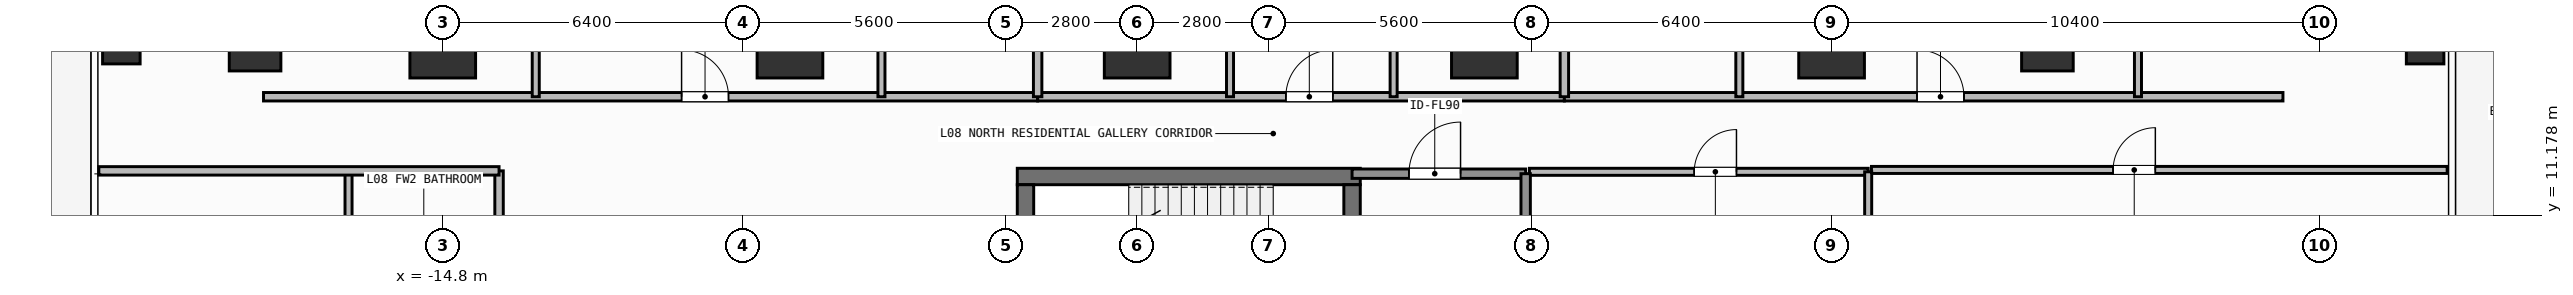
"""IFC4 building model, lengths in metres.
Left out: names, types, materials, properties, quantities, classifications, styles, units other than length and angle.
Written with IfcOpenShell. Run it as: python <this file> out.ifc"""

import sys

from ifc_helpers import new_model, si_unit, direction, frame, frame_2d, origin, origin_2d, place, context, subcontext, project, spatial, rectangle, hollow_rectangle, extrude, element, fill, save


model = new_model("IFC4")
c1 = context("Model", 3, precision=1e-05, world=origin(), true_north=direction((0.0, 1.0)))
c2 = subcontext(c1, "Body", "Model", "MODEL_VIEW")
j1 = project(units=[si_unit("LENGTHUNIT", "METRE"), si_unit("PLANEANGLEUNIT", "RADIAN")], contexts=[c1])
p1 = place(None, origin())
s1 = spatial("IfcSite", under=j1, at=p1, CompositionType="ELEMENT")
p2 = place(p1, origin())
s2 = spatial("IfcBuilding", under=s1, at=p2, CompositionType="ELEMENT")
p3 = place(p2, frame((0.0, 0.0, 30.6)))
s3 = spatial("IfcBuildingStorey", under=s2, at=p3, CompositionType="ELEMENT", Elevation=30.6)
p4 = place(p3, frame((-2.555, 12.0, 0.0), z_axis=(0.0, 0.0, 1.0), x_axis=(1.0, 0.0, 0.0)))
e1 = element("IfcWall", 1, at=p4, inside=s3, PredefinedType="SHEAR", context=c2, shape_type="SweptSolid", body=[
    extrude(rectangle(XDim=7.31, YDim=0.35, at=frame_2d((3.655, 0.0))), origin(), (0.0, 0.0, 1.0), 3.9),
])
p5 = place(p3, frame((-2.38, 8.9, 0.0), z_axis=(0.0, 0.0, 1.0), x_axis=(0.0, 1.0, 0.0)))
e2 = element("IfcWall", 2, at=p5, inside=s3, PredefinedType="SHEAR", context=c2, shape_type="SweptSolid", body=[
    extrude(rectangle(XDim=2.925, YDim=0.35, at=frame_2d((1.462, 0.0))), origin(), (0.0, 0.0, 1.0), 3.9),
])
p6 = place(p3, frame((4.58, 11.825, 0.0), z_axis=(0.0, 0.0, 1.0), x_axis=(0.0, -1.0, 0.0)))
e3 = element("IfcWall", 3, at=p6, inside=s3, PredefinedType="SHEAR", context=c2, shape_type="SweptSolid", body=[
    extrude(rectangle(XDim=2.925, YDim=0.35, at=frame_2d((1.462, 0.0))), origin(), (0.0, 0.0, 1.0), 3.9),
])
p7 = place(p6, frame((0.913, 0.0, 0.0)))
e4 = element("IfcOpeningElement", 4, at=p7, cuts=e3, PredefinedType="OPENING", context=c2, shape_type="SweptSolid", body=[
    extrude(rectangle(XDim=1.1, YDim=2.15, at=frame_2d((0.55, 1.075))), frame((0.0, 0.185, 0.0), z_axis=(0.0, -1.0, 0.0), x_axis=(1.0, 0.0, 0.0)), (0.0, 0.0, 1.0), 0.37),
])
for number, where, z_axis, x_axis in (
    (5, (-14.8, 14.8, 0.0), (0.0, 0.0, 1.0), (1.0, 0.0, 0.0)),
    (6, (-7.4, 14.8, 0.0), (0.0, 0.0, 1.0), (1.0, 0.0, 0.0)),
    (7, (0.0, 14.8, 0.0), (0.0, 0.0, 1.0), (1.0, 0.0, 0.0)),
    (8, (7.4, 14.8, 0.0), (0.0, 0.0, 1.0), (1.0, 0.0, 0.0)),
    (9, (14.8, 14.8, 0.0), (0.0, 0.0, 1.0), (1.0, 0.0, 0.0)),
):
    element("IfcColumn", number, at=place(p3, frame(where, z_axis=z_axis, x_axis=x_axis)), inside=s3, PredefinedType="COLUMN", context=c2, shape_type="SweptSolid", body=[
        extrude(rectangle(XDim=1.4, YDim=1.4, at=origin_2d()), origin(), (0.0, 0.0, 1.0), 3.9),
    ])
for number, where, z_axis, x_axis in (
    (10, (-18.8, 14.8, 0.0), (0.0, 0.0, 1.0), (1.0, 0.0, 0.0)),
    (11, (19.4, 14.8, 0.0), (0.0, 0.0, 1.0), (1.0, 0.0, 0.0)),
):
    element("IfcColumn", number, at=place(p3, frame(where, z_axis=z_axis, x_axis=x_axis)), inside=s3, PredefinedType="COLUMN", context=c2, shape_type="SweptSolid", body=[
        extrude(rectangle(XDim=1.1, YDim=1.1, at=origin_2d()), origin(), (0.0, 0.0, 1.0), 3.9),
    ])
for number, where, z_axis, x_axis in (
    (12, (-21.65, 14.8, 0.0), (0.0, 0.0, 1.0), (1.0, 0.0, 0.0)),
    (13, (27.45, 14.8, 0.0), (0.0, 0.0, 1.0), (1.0, 0.0, 0.0)),
):
    element("IfcColumn", number, at=place(p3, frame(where, z_axis=z_axis, x_axis=x_axis)), inside=s3, PredefinedType="COLUMN", context=c2, shape_type="SweptSolid", body=[
        extrude(hollow_rectangle(XDim=0.8, YDim=0.8, WallThickness=0.036, at=origin_2d()), origin(), (0.0, 0.0, 1.0), 3.9),
    ])
p8 = place(p3, frame((4.58, 12.06, 0.0), z_axis=(0.0, 0.0, 1.0), x_axis=(1.0, 0.0, 0.0)))
e14 = element("IfcWall", 14, at=p8, inside=s3, PredefinedType="SOLIDWALL", context=c2, shape_type="SweptSolid", body=[
    extrude(rectangle(XDim=3.7, YDim=0.2, at=frame_2d((1.85, 0.0))), origin(), (0.0, 0.0, 1.0), 3.68),
])
p9 = place(p8, frame((1.212, 0.0, 0.0)))
e15 = element("IfcOpeningElement", 15, at=p9, cuts=e14, PredefinedType="OPENING", context=c2, shape_type="SweptSolid", body=[
    extrude(rectangle(XDim=1.1, YDim=2.15, at=frame_2d((0.55, 1.075))), frame((0.0, 0.11, 0.0), z_axis=(0.0, -1.0, 0.0), x_axis=(1.0, 0.0, 0.0)), (0.0, 0.0, 1.0), 0.22),
])
p10 = place(p3, frame((8.36, 12.1, 0.0), z_axis=(0.0, 0.0, 1.0), x_axis=(1.0, 0.0, 0.0)))
e16 = element("IfcWall", 16, at=p10, inside=s3, PredefinedType="PARTITIONING", context=c2, shape_type="SweptSolid", body=[
    extrude(rectangle(XDim=7.22, YDim=0.15, at=frame_2d((3.61, 0.0))), origin(), (0.0, 0.0, 1.0), 3.68),
])
p11 = place(p10, frame((3.513, 0.0, 0.0)))
e17 = element("IfcOpeningElement", 17, at=p11, cuts=e16, PredefinedType="OPENING", context=c2, shape_type="SweptSolid", body=[
    extrude(rectangle(XDim=0.9, YDim=2.1, at=frame_2d((0.45, 1.05))), frame((0.0, 0.085, 0.0), z_axis=(0.0, -1.0, 0.0), x_axis=(1.0, 0.0, 0.0)), (0.0, 0.0, 1.0), 0.17),
])
p12 = place(p3, frame((-18.62, 13.7, 0.0), z_axis=(0.0, 0.0, 1.0), x_axis=(1.0, 0.0, 0.0)))
e18 = element("IfcWall", 18, at=p12, inside=s3, PredefinedType="PARTITIONING", context=c2, shape_type="SweptSolid", body=[
    extrude(rectangle(XDim=16.499, YDim=0.18, at=frame_2d((8.25, 0.0))), origin(), (0.0, 0.0, 1.0), 3.68),
])
p13 = place(p12, frame((8.91, 0.0, 0.0)))
e19 = element("IfcOpeningElement", 19, at=p13, cuts=e18, PredefinedType="OPENING", context=c2, shape_type="SweptSolid", body=[
    extrude(rectangle(XDim=1.0, YDim=2.2, at=frame_2d((0.5, 1.1))), frame((0.0, 0.1, 0.0), z_axis=(0.0, -1.0, 0.0), x_axis=(1.0, 0.0, 0.0)), (0.0, 0.0, 1.0), 0.2),
])
p14 = place(p3, frame((-12.818, 13.7, 0.0), z_axis=(0.0, 0.0, 1.0), x_axis=(0.0, 1.0, 0.0)))
e20 = element("IfcWall", 20, at=p14, inside=s3, PredefinedType="PARTITIONING", context=c2, shape_type="SweptSolid", body=[
    extrude(rectangle(XDim=7.09, YDim=0.15, at=frame_2d((3.545, 0.0))), origin(), (0.0, 0.0, 1.0), 3.68),
])
p15 = place(p14, frame((3.03, 0.0, 0.0)))
e21 = element("IfcOpeningElement", 21, at=p15, cuts=e20, PredefinedType="OPENING", context=c2, shape_type="SweptSolid", body=[
    extrude(rectangle(XDim=0.85, YDim=2.1, at=frame_2d((0.425, 1.05))), frame((0.0, 0.085, 0.0), z_axis=(0.0, -1.0, 0.0), x_axis=(1.0, 0.0, 0.0)), (0.0, 0.0, 1.0), 0.17),
])
p16 = place(p3, frame((-5.45, 13.7, 0.0), z_axis=(0.0, 0.0, 1.0), x_axis=(0.0, 1.0, 0.0)))
e22 = element("IfcWall", 22, at=p16, inside=s3, PredefinedType="PARTITIONING", context=c2, shape_type="SweptSolid", body=[
    extrude(rectangle(XDim=4.566, YDim=0.15, at=frame_2d((2.283, 0.0))), origin(), (0.0, 0.0, 1.0), 3.68),
])
p17 = place(p16, frame((1.948, 0.0, 0.0)))
e23 = element("IfcOpeningElement", 23, at=p17, cuts=e22, PredefinedType="OPENING", context=c2, shape_type="SweptSolid", body=[
    extrude(rectangle(XDim=0.85, YDim=2.1, at=frame_2d((0.425, 1.05))), frame((0.0, 0.085, 0.0), z_axis=(0.0, -1.0, 0.0), x_axis=(1.0, 0.0, 0.0)), (0.0, 0.0, 1.0), 0.17),
])
p18 = place(p3, frame((-2.121, 13.7, 0.0), z_axis=(0.0, 0.0, 1.0), x_axis=(1.0, 0.0, 0.0)))
e24 = element("IfcWall", 24, at=p18, inside=s3, PredefinedType="PARTITIONING", context=c2, shape_type="SweptSolid", body=[
    extrude(rectangle(XDim=11.226, YDim=0.18, at=frame_2d((5.613, 0.0))), origin(), (0.0, 0.0, 1.0), 3.68),
])
p19 = place(p18, frame((5.29, 0.0, 0.0)))
e25 = element("IfcOpeningElement", 25, at=p19, cuts=e24, PredefinedType="OPENING", context=c2, shape_type="SweptSolid", body=[
    extrude(rectangle(XDim=1.0, YDim=2.2, at=frame_2d((0.5, 1.1))), frame((0.0, 0.1, 0.0), z_axis=(0.0, -1.0, 0.0), x_axis=(1.0, 0.0, 0.0)), (0.0, 0.0, 1.0), 0.2),
])
p20 = place(p3, frame((1.979, 13.7, 0.0), z_axis=(0.0, 0.0, 1.0), x_axis=(0.0, 1.0, 0.0)))
e26 = element("IfcWall", 26, at=p20, inside=s3, PredefinedType="PARTITIONING", context=c2, shape_type="SweptSolid", body=[
    extrude(rectangle(XDim=7.09, YDim=0.15, at=frame_2d((3.545, 0.0))), origin(), (0.0, 0.0, 1.0), 3.68),
])
p21 = place(p20, frame((3.03, 0.0, 0.0)))
e27 = element("IfcOpeningElement", 27, at=p21, cuts=e26, PredefinedType="OPENING", context=c2, shape_type="SweptSolid", body=[
    extrude(rectangle(XDim=0.85, YDim=2.1, at=frame_2d((0.425, 1.05))), frame((0.0, 0.085, 0.0), z_axis=(0.0, -1.0, 0.0), x_axis=(1.0, 0.0, 0.0)), (0.0, 0.0, 1.0), 0.17),
])
p22 = place(p3, frame((5.466, 13.7, 0.0), z_axis=(0.0, 0.0, 1.0), x_axis=(0.0, 1.0, 0.0)))
e28 = element("IfcWall", 28, at=p22, inside=s3, PredefinedType="PARTITIONING", context=c2, shape_type="SweptSolid", body=[
    extrude(rectangle(XDim=7.09, YDim=0.15, at=frame_2d((3.545, 0.0))), origin(), (0.0, 0.0, 1.0), 3.68),
])
p23 = place(p22, frame((3.03, 0.0, 0.0)))
e29 = element("IfcOpeningElement", 29, at=p23, cuts=e28, PredefinedType="OPENING", context=c2, shape_type="SweptSolid", body=[
    extrude(rectangle(XDim=0.85, YDim=2.1, at=frame_2d((0.425, 1.05))), frame((0.0, 0.085, 0.0), z_axis=(0.0, -1.0, 0.0), x_axis=(1.0, 0.0, 0.0)), (0.0, 0.0, 1.0), 0.17),
])
p24 = place(p3, frame((9.105, 13.7, 0.0), z_axis=(0.0, 0.0, 1.0), x_axis=(1.0, 0.0, 0.0)))
e30 = element("IfcWall", 30, at=p24, inside=s3, PredefinedType="PARTITIONING", context=c2, shape_type="SweptSolid", body=[
    extrude(rectangle(XDim=15.315, YDim=0.18, at=frame_2d((7.657, 0.0))), origin(), (0.0, 0.0, 1.0), 3.68),
])
p25 = place(p24, frame((7.516, 0.0, 0.0)))
e31 = element("IfcOpeningElement", 31, at=p25, cuts=e30, PredefinedType="OPENING", context=c2, shape_type="SweptSolid", body=[
    extrude(rectangle(XDim=1.0, YDim=2.2, at=frame_2d((0.5, 1.1))), frame((0.0, 0.1, 0.0), z_axis=(0.0, -1.0, 0.0), x_axis=(1.0, 0.0, 0.0)), (0.0, 0.0, 1.0), 0.2),
])
p26 = place(p3, frame((12.834, 13.7, 0.0), z_axis=(0.0, 0.0, 1.0), x_axis=(0.0, 1.0, 0.0)))
e32 = element("IfcWall", 32, at=p26, inside=s3, PredefinedType="PARTITIONING", context=c2, shape_type="SweptSolid", body=[
    extrude(rectangle(XDim=7.09, YDim=0.15, at=frame_2d((3.545, 0.0))), origin(), (0.0, 0.0, 1.0), 3.68),
])
p27 = place(p26, frame((3.03, 0.0, 0.0)))
e33 = element("IfcOpeningElement", 33, at=p27, cuts=e32, PredefinedType="OPENING", context=c2, shape_type="SweptSolid", body=[
    extrude(rectangle(XDim=0.85, YDim=2.1, at=frame_2d((0.425, 1.05))), frame((0.0, 0.085, 0.0), z_axis=(0.0, -1.0, 0.0), x_axis=(1.0, 0.0, 0.0)), (0.0, 0.0, 1.0), 0.17),
])
p28 = place(p3, frame((21.33, 13.7, 0.0), z_axis=(0.0, 0.0, 1.0), x_axis=(0.0, 1.0, 0.0)))
e34 = element("IfcWall", 34, at=p28, inside=s3, PredefinedType="PARTITIONING", context=c2, shape_type="SweptSolid", body=[
    extrude(rectangle(XDim=4.148, YDim=0.15, at=frame_2d((2.074, 0.0))), origin(), (0.0, 0.0, 1.0), 3.68),
])
p29 = place(p28, frame((1.737, 0.0, 0.0)))
e35 = element("IfcOpeningElement", 35, at=p29, cuts=e34, PredefinedType="OPENING", context=c2, shape_type="SweptSolid", body=[
    extrude(rectangle(XDim=0.85, YDim=2.1, at=frame_2d((0.425, 1.05))), frame((0.0, 0.085, 0.0), z_axis=(0.0, -1.0, 0.0), x_axis=(1.0, 0.0, 0.0)), (0.0, 0.0, 1.0), 0.17),
])
p30 = place(p3, frame((-13.6, 0.727, 0.0), z_axis=(0.0, 0.0, 1.0), x_axis=(0.0, 1.0, 0.0)))
e36 = element("IfcWall", 36, at=p30, inside=s3, PredefinedType="PARTITIONING", context=c2, shape_type="SweptSolid", body=[
    extrude(rectangle(XDim=11.393, YDim=0.18, at=frame_2d((5.697, 0.0))), origin(), (0.0, 0.0, 1.0), 3.68),
])
p31 = place(p30, frame((4.837, 0.0, 0.0)))
e37 = element("IfcOpeningElement", 37, at=p31, cuts=e36, PredefinedType="OPENING", context=c2, shape_type="SweptSolid", body=[
    extrude(rectangle(XDim=1.0, YDim=2.2, at=frame_2d((0.5, 1.1))), frame((0.0, 0.1, 0.0), z_axis=(0.0, -1.0, 0.0), x_axis=(1.0, 0.0, 0.0)), (0.0, 0.0, 1.0), 0.2),
])
p32 = place(p3, frame((15.65, 12.14, 0.0), z_axis=(0.0, 0.0, 1.0), x_axis=(1.0, 0.0, 0.0)))
e38 = element("IfcWall", 38, at=p32, inside=s3, PredefinedType="PARTITIONING", context=c2, shape_type="SweptSolid", body=[
    extrude(rectangle(XDim=12.27, YDim=0.15, at=frame_2d((6.135, 0.0))), origin(), (0.0, 0.0, 1.0), 3.68),
])
p33 = place(p32, frame((5.15, 0.0, 0.0)))
e39 = element("IfcOpeningElement", 39, at=p33, cuts=e38, PredefinedType="OPENING", context=c2, shape_type="SweptSolid", body=[
    extrude(rectangle(XDim=0.9, YDim=2.1, at=frame_2d((0.45, 1.05))), frame((0.0, 0.085, 0.0), z_axis=(0.0, -1.0, 0.0), x_axis=(1.0, 0.0, 0.0)), (0.0, 0.0, 1.0), 0.17),
])
p34 = place(p3, frame((8.28, 8.95, 0.0), z_axis=(0.0, 0.0, 1.0), x_axis=(0.0, 1.0, 0.0)))
e40 = element("IfcWall", 40, at=p34, inside=s3, PredefinedType="SOLIDWALL", context=c2, shape_type="SweptSolid", body=[
    extrude(rectangle(XDim=3.11, YDim=0.2, at=frame_2d((1.555, 0.0))), origin(), (0.0, 0.0, 1.0), 3.68),
])
p35 = place(p3, frame((15.58, 5.85, 0.0), z_axis=(0.0, 0.0, 1.0), x_axis=(0.0, 1.0, 0.0)))
e41 = element("IfcWall", 41, at=p35, inside=s3, PredefinedType="PARTITIONING", context=c2, shape_type="SweptSolid", body=[
    extrude(rectangle(XDim=6.25, YDim=0.15, at=frame_2d((3.125, 0.0))), origin(), (0.0, 0.0, 1.0), 3.68),
])
for number, where, z_axis, x_axis in (
    (42, (-2.121, 13.7, 0.0), (0.0, 0.0, 1.0), (0.0, 1.0, 0.0)),
    (43, (9.105, 13.7, 0.0), (0.0, 0.0, 1.0), (0.0, 1.0, 0.0)),
):
    element("IfcWall", number, at=place(p3, frame(where, z_axis=z_axis, x_axis=x_axis)), inside=s3, PredefinedType="PARTITIONING", context=c2, shape_type="SweptSolid", body=[
        extrude(rectangle(XDim=11.33, YDim=0.18, at=frame_2d((5.665, 0.0))), origin(), (0.0, 0.0, 1.0), 3.68),
    ])
p36 = place(p3, frame((-16.808, 9.32, 0.0), z_axis=(0.0, 0.0, 1.0), x_axis=(0.0, 1.0, 0.0)))
e44 = element("IfcWall", 44, at=p36, inside=s3, PredefinedType="PARTITIONING", context=c2, shape_type="SweptSolid", body=[
    extrude(rectangle(XDim=2.8, YDim=0.15, at=frame_2d((1.4, 0.0))), origin(), (0.0, 0.0, 1.0), 3.68),
])
p37 = place(p3, frame((-22.13, 12.12, 0.0), z_axis=(0.0, 0.0, 1.0), x_axis=(1.0, 0.0, 0.0)))
e45 = element("IfcWall", 45, at=p37, inside=s3, PredefinedType="PARTITIONING", context=c2, shape_type="SweptSolid", body=[
    extrude(rectangle(XDim=8.53, YDim=0.18, at=frame_2d((4.265, 0.0))), origin(), (0.0, 0.0, 1.0), 3.68),
])
p38 = place(p9, origin())
e46 = element("IfcDoor", 46, at=p38, inside=s3, OperationType="SINGLE_SWING_RIGHT", PredefinedType="DOOR", context=c2, shape_type="SweptSolid", body=[
    extrude(rectangle(XDim=1.1, YDim=2.15, at=frame_2d((0.55, 1.075))), frame((0.0, 0.025, 0.0), z_axis=(0.0, -1.0, 0.0), x_axis=(1.0, 0.0, 0.0)), (0.0, 0.0, 1.0), 0.05),
])
fill(e15, e46)
p39 = place(p11, origin())
e47 = element("IfcDoor", 47, at=p39, inside=s3, OperationType="SINGLE_SWING_RIGHT", PredefinedType="DOOR", context=c2, shape_type="SweptSolid", body=[
    extrude(rectangle(XDim=0.9, YDim=2.1, at=frame_2d((0.45, 1.05))), frame((0.0, 0.025, 0.0), z_axis=(0.0, -1.0, 0.0), x_axis=(1.0, 0.0, 0.0)), (0.0, 0.0, 1.0), 0.05),
])
fill(e17, e47)
p40 = place(p13, origin())
e48 = element("IfcDoor", 48, at=p40, inside=s3, OperationType="SINGLE_SWING_LEFT", PredefinedType="DOOR", context=c2, shape_type="SweptSolid", body=[
    extrude(rectangle(XDim=1.0, YDim=2.2, at=frame_2d((0.5, 1.1))), frame((0.0, 0.025, 0.0), z_axis=(0.0, -1.0, 0.0), x_axis=(1.0, 0.0, 0.0)), (0.0, 0.0, 1.0), 0.05),
])
fill(e19, e48)
p41 = place(p19, origin())
e49 = element("IfcDoor", 49, at=p41, inside=s3, OperationType="SINGLE_SWING_RIGHT", PredefinedType="DOOR", context=c2, shape_type="SweptSolid", body=[
    extrude(rectangle(XDim=1.0, YDim=2.2, at=frame_2d((0.5, 1.1))), frame((0.0, 0.025, 0.0), z_axis=(0.0, -1.0, 0.0), x_axis=(1.0, 0.0, 0.0)), (0.0, 0.0, 1.0), 0.05),
])
fill(e25, e49)
p42 = place(p25, origin())
e50 = element("IfcDoor", 50, at=p42, inside=s3, OperationType="SINGLE_SWING_LEFT", PredefinedType="DOOR", context=c2, shape_type="SweptSolid", body=[
    extrude(rectangle(XDim=1.0, YDim=2.2, at=frame_2d((0.5, 1.1))), frame((0.0, 0.025, 0.0), z_axis=(0.0, -1.0, 0.0), x_axis=(1.0, 0.0, 0.0)), (0.0, 0.0, 1.0), 0.05),
])
fill(e31, e50)
p43 = place(p33, origin())
e51 = element("IfcDoor", 51, at=p43, inside=s3, OperationType="SINGLE_SWING_RIGHT", PredefinedType="DOOR", context=c2, shape_type="SweptSolid", body=[
    extrude(rectangle(XDim=0.9, YDim=2.1, at=frame_2d((0.45, 1.05))), frame((0.0, 0.025, 0.0), z_axis=(0.0, -1.0, 0.0), x_axis=(1.0, 0.0, 0.0)), (0.0, 0.0, 1.0), 0.05),
])
fill(e39, e51)
save(model, sys.argv[1])
